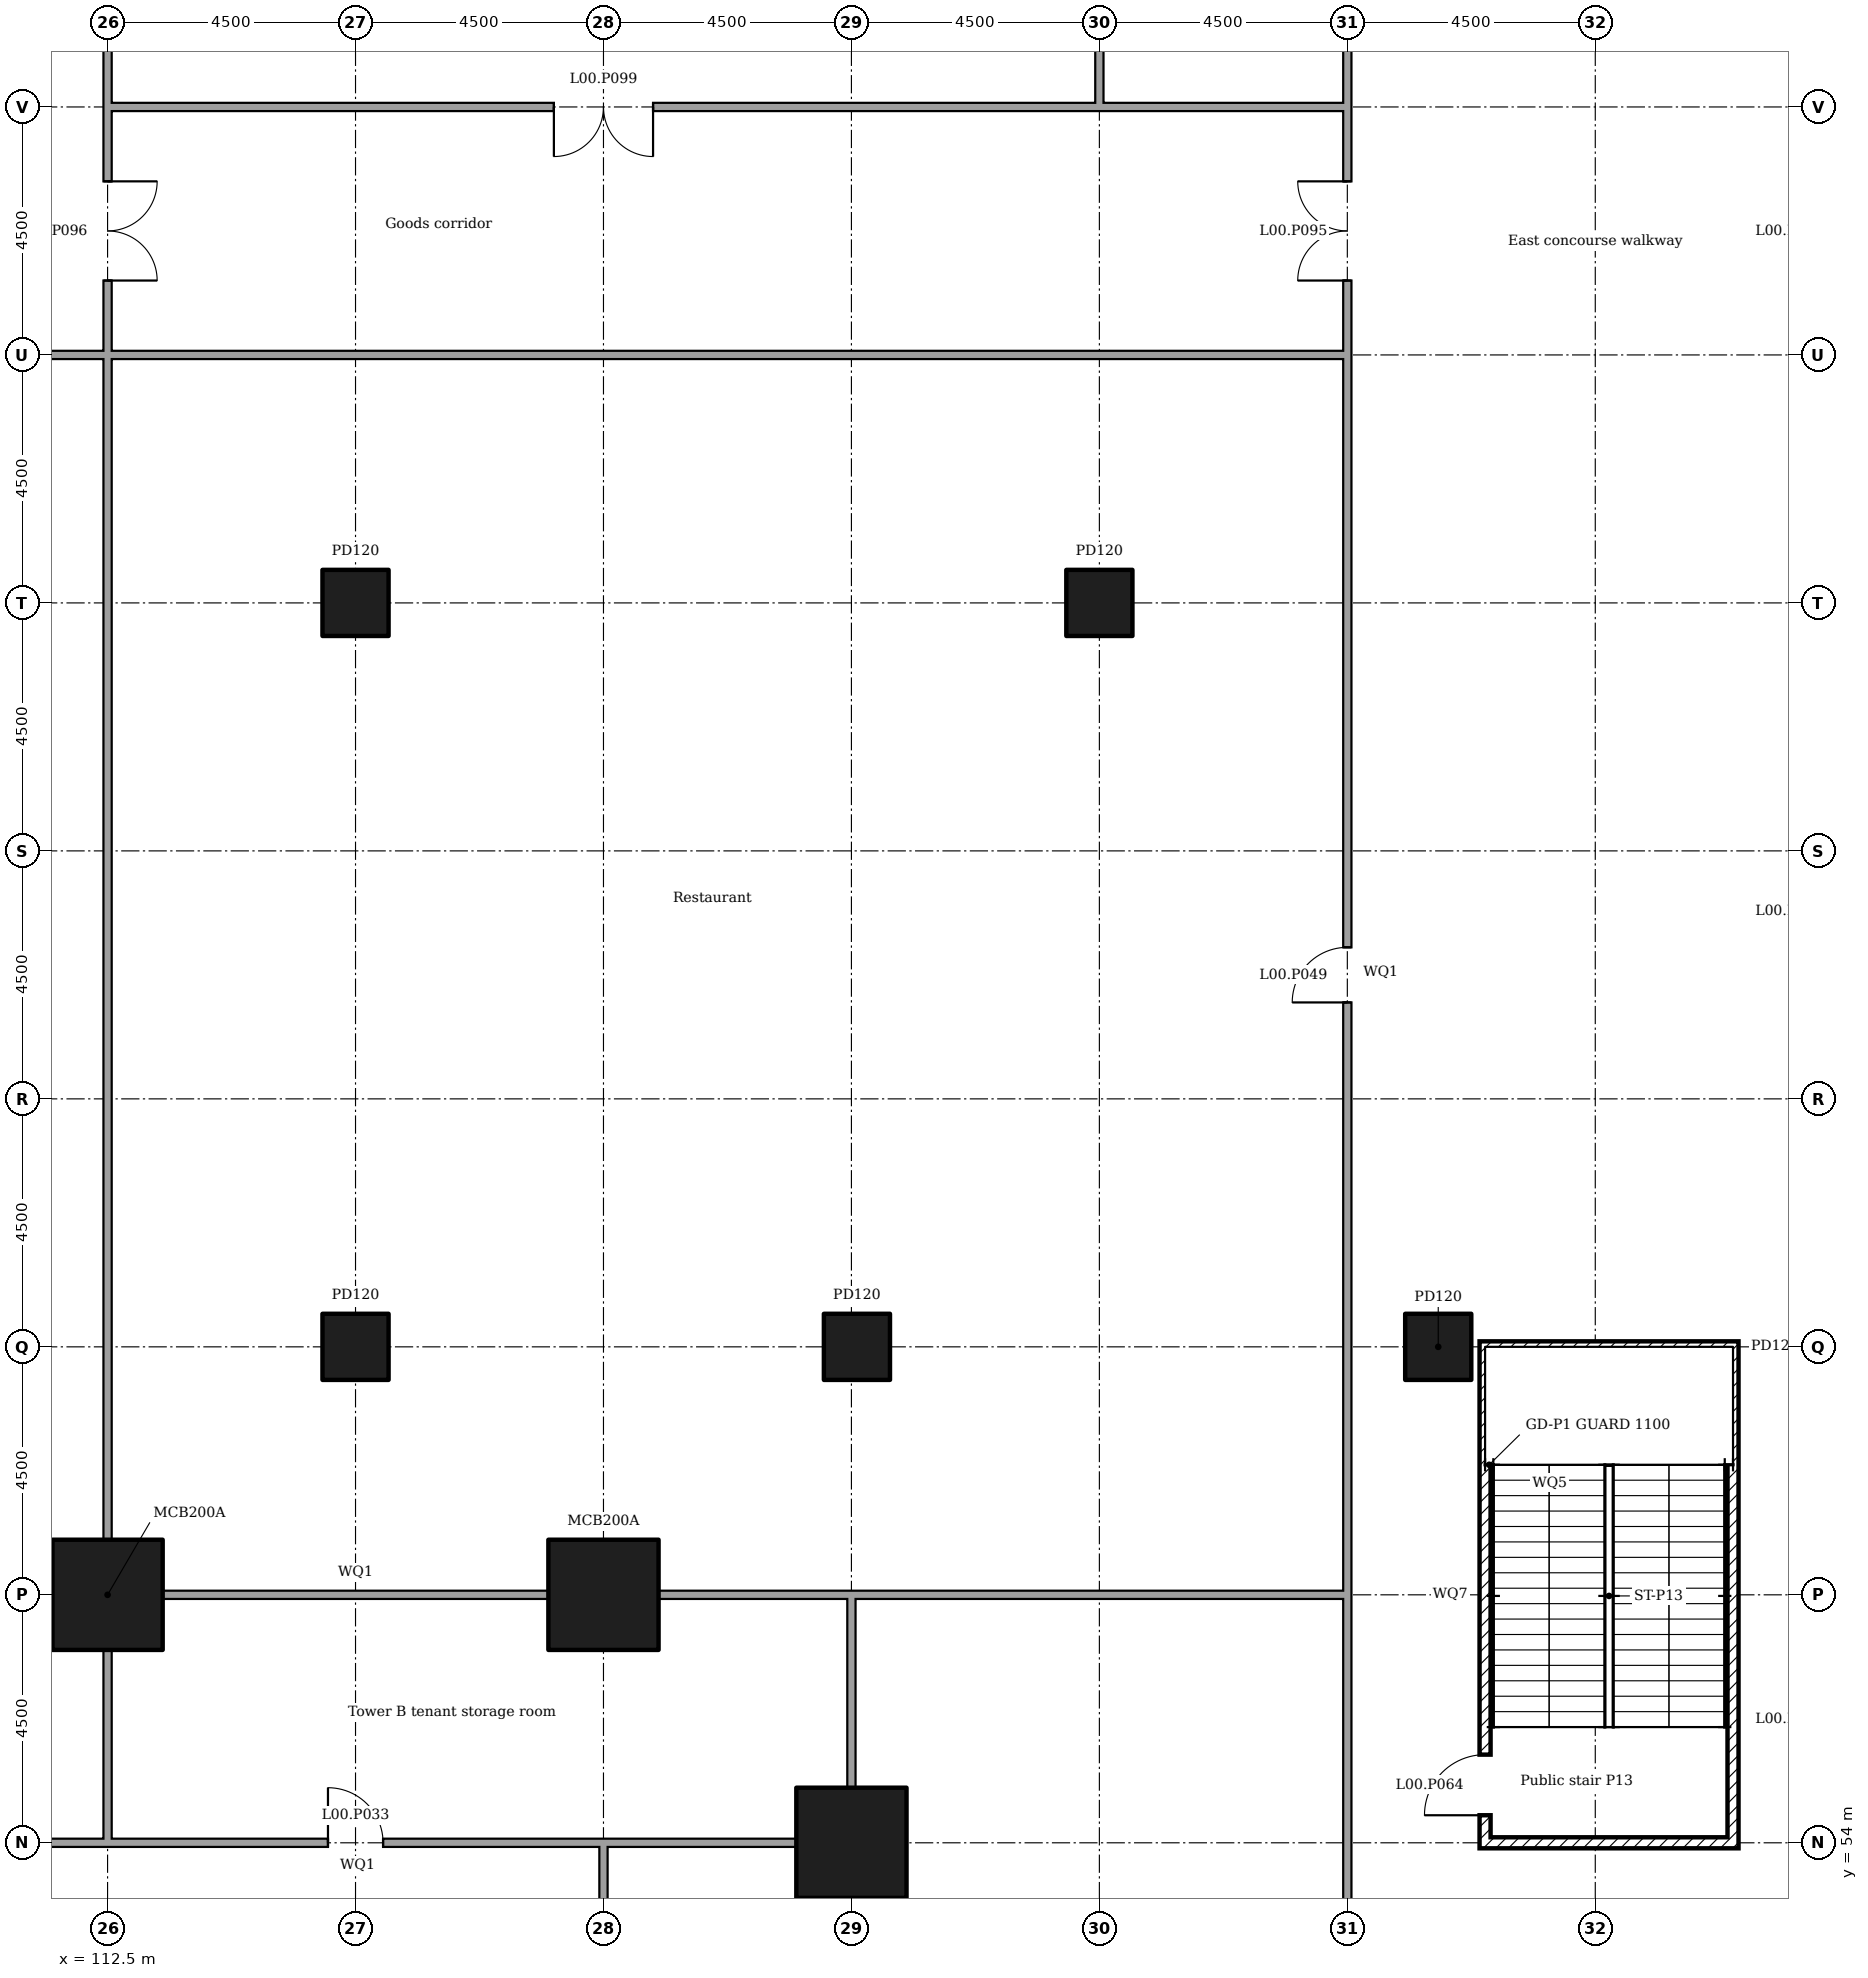
"""IFC4 building model, lengths in metres.
Left out: names, types, materials, properties, quantities, classifications, styles, units other than length and angle.
Written with IfcOpenShell. Run it as: python <this file> out.ifc"""

import sys

from ifc_helpers import new_model, si_unit, direction, frame, frame_2d, origin, origin_2d, place, context, subcontext, project, spatial, rectangle, extrude, element, fill, save


model = new_model("IFC4")
c1 = context("Model", 3, precision=1e-05, world=origin(), true_north=direction((0.0, 1.0)))
c2 = subcontext(c1, "Body", "Model", "MODEL_VIEW")
j1 = project(units=[si_unit("LENGTHUNIT", "METRE"), si_unit("PLANEANGLEUNIT", "RADIAN")], contexts=[c1])
p1 = place(None, origin())
s1 = spatial("IfcSite", under=j1, at=p1, CompositionType="ELEMENT")
p2 = place(p1, origin())
s2 = spatial("IfcBuilding", under=s1, at=p2, CompositionType="ELEMENT")
p3 = place(p2, origin())
s3 = spatial("IfcBuildingStorey", under=s2, at=p3, CompositionType="ELEMENT", Elevation=0.0)
for number, where in (
    (1, (112.5, 58.5, 0.0)),
    (2, (121.5, 58.5, 0.0)),
    (3, (126.0, 54.0, 0.0)),
):
    element("IfcColumn", number, at=place(p3, frame(where)), inside=s3, PredefinedType="COLUMN", context=c2, shape_type="SweptSolid", body=[
        extrude(rectangle(XDim=2.0, YDim=2.0, at=origin_2d()), origin(), (0.0, 0.0, 1.0), 6.0),
    ])
for number, where in (
    (4, (117.0, 63.0, 0.0)),
    (5, (117.0, 76.5, 0.0)),
    (6, (126.1, 63.0, 0.0)),
    (7, (130.5, 76.5, 0.0)),
    (8, (136.65, 63.0, 0.0)),
):
    element("IfcColumn", number, at=place(p3, frame(where)), inside=s3, PredefinedType="COLUMN", context=c2, shape_type="SweptSolid", body=[
        extrude(rectangle(XDim=1.2, YDim=1.2, at=origin_2d()), origin(), (0.0, 0.0, 1.0), 6.0),
    ])
p4 = place(p3, frame((104.02, 54.0, 0.0)))
e9 = element("IfcWall", 9, at=p4, inside=s3, PredefinedType="PARTITIONING", context=c2, shape_type="SweptSolid", body=[
    extrude(rectangle(XDim=8.555, YDim=0.15, at=frame_2d((4.277, 0.0))), origin(), (0.0, 0.0, 1.0), 5.55),
])
p5 = place(p4, frame((3.75, 0.0, 0.0)))
e10 = element("IfcOpeningElement", 10, at=p5, cuts=e9, PredefinedType="OPENING", context=c2, shape_type="SweptSolid", body=[
    extrude(rectangle(XDim=1.0, YDim=2.1, at=frame_2d((0.5, 1.05))), frame((0.0, 0.085, 0.0), z_axis=(0.0, -1.0, 0.0), x_axis=(1.0, 0.0, 0.0)), (0.0, 0.0, 1.0), 0.17),
])
p6 = place(p3, frame((112.5, 54.0, 0.0)))
e11 = element("IfcWall", 11, at=p6, inside=s3, PredefinedType="PARTITIONING", context=c2, shape_type="SweptSolid", body=[
    extrude(rectangle(XDim=9.075, YDim=0.15, at=frame_2d((4.538, 0.0))), origin(), (0.0, 0.0, 1.0), 5.55),
])
p7 = place(p6, frame((4.0, 0.0, 0.0)))
e12 = element("IfcOpeningElement", 12, at=p7, cuts=e11, PredefinedType="OPENING", context=c2, shape_type="SweptSolid", body=[
    extrude(rectangle(XDim=1.0, YDim=2.1, at=frame_2d((0.5, 1.05))), frame((0.0, 0.085, 0.0), z_axis=(0.0, -1.0, 0.0), x_axis=(1.0, 0.0, 0.0)), (0.0, 0.0, 1.0), 0.17),
])
p8 = place(p3, frame((121.5, 50.02, 0.0), z_axis=(0.0, 0.0, 1.0), x_axis=(0.0, 1.0, 0.0)))
e13 = element("IfcWall", 13, at=p8, inside=s3, PredefinedType="PARTITIONING", context=c2, shape_type="SweptSolid", body=[
    extrude(rectangle(XDim=3.905, YDim=0.15, at=frame_2d((1.953, 0.0))), origin(), (0.0, 0.0, 1.0), 5.55),
])
p9 = place(p3, frame((112.5, 54.075, 0.0), z_axis=(0.0, 0.0, 1.0), x_axis=(0.0, 1.0, 0.0)))
e14 = element("IfcWall", 14, at=p9, inside=s3, PredefinedType="PARTITIONING", context=c2, shape_type="SweptSolid", body=[
    extrude(rectangle(XDim=3.43, YDim=0.15, at=frame_2d((1.715, 0.0))), origin(), (0.0, 0.0, 1.0), 5.55),
])
p10 = place(p3, frame((99.995, 58.5, 0.0)))
e15 = element("IfcWall", 15, at=p10, inside=s3, PredefinedType="PARTITIONING", context=c2, shape_type="SweptSolid", body=[
    extrude(rectangle(XDim=11.51, YDim=0.15, at=frame_2d((5.755, 0.0))), origin(), (0.0, 0.0, 1.0), 5.55),
])
p11 = place(p3, frame((121.5, 54.0, 0.0)))
e16 = element("IfcWall", 16, at=p11, inside=s3, PredefinedType="PARTITIONING", context=c2, shape_type="SweptSolid", body=[
    extrude(rectangle(XDim=3.505, YDim=0.15, at=frame_2d((1.752, 0.0))), origin(), (0.0, 0.0, 1.0), 5.55),
])
p12 = place(p3, frame((126.0, 54.995, 0.0), z_axis=(0.0, 0.0, 1.0), x_axis=(0.0, 1.0, 0.0)))
e17 = element("IfcWall", 17, at=p12, inside=s3, PredefinedType="PARTITIONING", context=c2, shape_type="SweptSolid", body=[
    extrude(rectangle(XDim=3.58, YDim=0.15, at=frame_2d((1.79, 0.0))), origin(), (0.0, 0.0, 1.0), 5.55),
])
p13 = place(p3, frame((113.495, 58.5, 0.0)))
e18 = element("IfcWall", 18, at=p13, inside=s3, PredefinedType="PARTITIONING", context=c2, shape_type="SweptSolid", body=[
    extrude(rectangle(XDim=7.01, YDim=0.15, at=frame_2d((3.505, 0.0))), origin(), (0.0, 0.0, 1.0), 5.55),
])
p14 = place(p3, frame((122.495, 58.5, 0.0)))
e19 = element("IfcWall", 19, at=p14, inside=s3, PredefinedType="PARTITIONING", context=c2, shape_type="SweptSolid", body=[
    extrude(rectangle(XDim=3.43, YDim=0.15, at=frame_2d((1.715, 0.0))), origin(), (0.0, 0.0, 1.0), 5.55),
])
p15 = place(p3, frame((126.0, 45.995, 0.0), z_axis=(0.0, 0.0, 1.0), x_axis=(0.0, 1.0, 0.0)))
e20 = element("IfcWall", 20, at=p15, inside=s3, PredefinedType="PARTITIONING", context=c2, shape_type="SweptSolid", body=[
    extrude(rectangle(XDim=7.01, YDim=0.15, at=frame_2d((3.505, 0.0))), origin(), (0.0, 0.0, 1.0), 5.55),
])
p16 = place(p3, frame((135.0, 45.0, 0.0), z_axis=(0.0, 0.0, 1.0), x_axis=(0.0, 1.0, 0.0)))
e21 = element("IfcWall", 21, at=p16, inside=s3, PredefinedType="PARTITIONING", context=c2, shape_type="SweptSolid", body=[
    extrude(rectangle(XDim=13.575, YDim=0.15, at=frame_2d((6.788, 0.0))), origin(), (0.0, 0.0, 1.0), 5.55),
])
p17 = place(p16, frame((6.25, 0.0, 0.0)))
e22 = element("IfcOpeningElement", 22, at=p17, cuts=e21, PredefinedType="OPENING", context=c2, shape_type="SweptSolid", body=[
    extrude(rectangle(XDim=1.0, YDim=2.1, at=frame_2d((0.5, 1.05))), frame((0.0, 0.085, 0.0), z_axis=(0.0, -1.0, 0.0), x_axis=(1.0, 0.0, 0.0)), (0.0, 0.0, 1.0), 0.17),
])
p18 = place(p3, frame((126.0, 58.5, 0.0)))
e23 = element("IfcWall", 23, at=p18, inside=s3, PredefinedType="PARTITIONING", context=c2, shape_type="SweptSolid", body=[
    extrude(rectangle(XDim=8.925, YDim=0.15, at=frame_2d((4.462, 0.0))), origin(), (0.0, 0.0, 1.0), 5.55),
])
p19 = place(p3, frame((135.0, 58.5, 0.0), z_axis=(0.0, 0.0, 1.0), x_axis=(0.0, 1.0, 0.0)))
e24 = element("IfcWall", 24, at=p19, inside=s3, PredefinedType="PARTITIONING", context=c2, shape_type="SweptSolid", body=[
    extrude(rectangle(XDim=22.575, YDim=0.15, at=frame_2d((11.288, 0.0))), origin(), (0.0, 0.0, 1.0), 5.55),
])
p20 = place(p19, frame((10.75, 0.0, 0.0)))
e25 = element("IfcOpeningElement", 25, at=p20, cuts=e24, PredefinedType="OPENING", context=c2, shape_type="SweptSolid", body=[
    extrude(rectangle(XDim=1.0, YDim=2.1, at=frame_2d((0.5, 1.05))), frame((0.0, 0.085, 0.0), z_axis=(0.0, -1.0, 0.0), x_axis=(1.0, 0.0, 0.0)), (0.0, 0.0, 1.0), 0.17),
])
p21 = place(p3, frame((135.0, 81.0, 0.0), z_axis=(0.0, 0.0, 1.0), x_axis=(0.0, 1.0, 0.0)))
e26 = element("IfcWall", 26, at=p21, inside=s3, PredefinedType="PARTITIONING", context=c2, shape_type="SweptSolid", body=[
    extrude(rectangle(XDim=4.575, YDim=0.15, at=frame_2d((2.288, 0.0))), origin(), (0.0, 0.0, 1.0), 5.55),
])
p22 = place(p21, frame((1.35, 0.0, 0.0)))
e27 = element("IfcOpeningElement", 27, at=p22, cuts=e26, PredefinedType="OPENING", context=c2, shape_type="SweptSolid", body=[
    extrude(rectangle(XDim=1.8, YDim=2.1, at=frame_2d((0.9, 1.05))), frame((0.0, 0.085, 0.0), z_axis=(0.0, -1.0, 0.0), x_axis=(1.0, 0.0, 0.0)), (0.0, 0.0, 1.0), 0.17),
])
p23 = place(p3, frame((135.0, 85.5, 0.0), z_axis=(0.0, 0.0, 1.0), x_axis=(0.0, 1.0, 0.0)))
e28 = element("IfcWall", 28, at=p23, inside=s3, PredefinedType="PARTITIONING", context=c2, shape_type="SweptSolid", body=[
    extrude(rectangle(XDim=4.575, YDim=0.15, at=frame_2d((2.288, 0.0))), origin(), (0.0, 0.0, 1.0), 5.55),
])
p24 = place(p3, frame((137.5, 53.9, 0.0), z_axis=(0.0, 0.0, 1.0), x_axis=(0.0, 1.0, 0.0)))
e29 = element("IfcWall", 29, at=p24, inside=s3, PredefinedType="SOLIDWALL", context=c2, shape_type="SweptSolid", body=[
    extrude(rectangle(XDim=9.2, YDim=0.2, at=frame_2d((4.6, 0.0))), origin(), (0.0, 0.0, 1.0), 5.55),
])
p25 = place(p24, frame((0.6, 0.0, 0.0)))
e30 = element("IfcOpeningElement", 30, at=p25, cuts=e29, PredefinedType="OPENING", context=c2, shape_type="SweptSolid", body=[
    extrude(rectangle(XDim=1.1, YDim=2.1, at=frame_2d((0.55, 1.05))), frame((0.0, 0.11, 0.0), z_axis=(0.0, -1.0, 0.0), x_axis=(1.0, 0.0, 0.0)), (0.0, 0.0, 1.0), 0.22),
])
p26 = place(p3, frame((142.0, 53.9, 0.0), z_axis=(0.0, 0.0, 1.0), x_axis=(0.0, 1.0, 0.0)))
e31 = element("IfcWall", 31, at=p26, inside=s3, PredefinedType="SOLIDWALL", context=c2, shape_type="SweptSolid", body=[
    extrude(rectangle(XDim=9.2, YDim=0.2, at=frame_2d((4.6, 0.0))), origin(), (0.0, 0.0, 1.0), 5.55),
])
for number, where in (
    (32, (137.6, 54.0, 0.0)),
    (33, (137.6, 63.0, 0.0)),
):
    element("IfcWall", number, at=place(p3, frame(where)), inside=s3, PredefinedType="SOLIDWALL", context=c2, shape_type="SweptSolid", body=[
        extrude(rectangle(XDim=4.3, YDim=0.2, at=frame_2d((2.15, 0.0))), origin(), (0.0, 0.0, 1.0), 5.55),
    ])
p27 = place(p3, frame((112.5, 59.495, 0.0), z_axis=(0.0, 0.0, 1.0), x_axis=(0.0, 1.0, 0.0)))
e34 = element("IfcWall", 34, at=p27, inside=s3, PredefinedType="PARTITIONING", context=c2, shape_type="SweptSolid", body=[
    extrude(rectangle(XDim=21.58, YDim=0.15, at=frame_2d((10.79, 0.0))), origin(), (0.0, 0.0, 1.0), 5.55),
])
p28 = place(p3, frame((94.575, 81.0, 0.0)))
e35 = element("IfcWall", 35, at=p28, inside=s3, PredefinedType="PARTITIONING", context=c2, shape_type="SweptSolid", body=[
    extrude(rectangle(XDim=17.85, YDim=0.15, at=frame_2d((8.925, 0.0))), origin(), (0.0, 0.0, 1.0), 5.55),
])
p29 = place(p3, frame((112.425, 81.0, 0.0)))
e36 = element("IfcWall", 36, at=p29, inside=s3, PredefinedType="PARTITIONING", context=c2, shape_type="SweptSolid", body=[
    extrude(rectangle(XDim=22.5, YDim=0.15, at=frame_2d((11.25, 0.0))), origin(), (0.0, 0.0, 1.0), 5.55),
])
p30 = place(p3, frame((112.5, 81.075, 0.0), z_axis=(0.0, 0.0, 1.0), x_axis=(0.0, 1.0, 0.0)))
e37 = element("IfcWall", 37, at=p30, inside=s3, PredefinedType="PARTITIONING", context=c2, shape_type="SweptSolid", body=[
    extrude(rectangle(XDim=4.5, YDim=0.15, at=frame_2d((2.25, 0.0))), origin(), (0.0, 0.0, 1.0), 5.55),
])
p31 = place(p30, frame((1.275, 0.0, 0.0)))
e38 = element("IfcOpeningElement", 38, at=p31, cuts=e37, PredefinedType="OPENING", context=c2, shape_type="SweptSolid", body=[
    extrude(rectangle(XDim=1.8, YDim=2.1, at=frame_2d((0.9, 1.05))), frame((0.0, 0.085, 0.0), z_axis=(0.0, -1.0, 0.0), x_axis=(1.0, 0.0, 0.0)), (0.0, 0.0, 1.0), 0.17),
])
p32 = place(p3, frame((112.5, 85.5, 0.0), z_axis=(0.0, 0.0, 1.0), x_axis=(0.0, 1.0, 0.0)))
e39 = element("IfcWall", 39, at=p32, inside=s3, PredefinedType="PARTITIONING", context=c2, shape_type="SweptSolid", body=[
    extrude(rectangle(XDim=4.425, YDim=0.15, at=frame_2d((2.212, 0.0))), origin(), (0.0, 0.0, 1.0), 5.55),
])
p33 = place(p32, frame((1.35, 0.0, 0.0)))
e40 = element("IfcOpeningElement", 40, at=p33, cuts=e39, PredefinedType="OPENING", context=c2, shape_type="SweptSolid", body=[
    extrude(rectangle(XDim=1.8, YDim=2.1, at=frame_2d((0.9, 1.05))), frame((0.0, 0.085, 0.0), z_axis=(0.0, -1.0, 0.0), x_axis=(1.0, 0.0, 0.0)), (0.0, 0.0, 1.0), 0.17),
])
p34 = place(p3, frame((112.575, 85.5, 0.0)))
e41 = element("IfcWall", 41, at=p34, inside=s3, PredefinedType="PARTITIONING", context=c2, shape_type="SweptSolid", body=[
    extrude(rectangle(XDim=18.0, YDim=0.15, at=frame_2d((9.0, 0.0))), origin(), (0.0, 0.0, 1.0), 5.55),
])
p35 = place(p34, frame((8.025, 0.0, 0.0)))
e42 = element("IfcOpeningElement", 42, at=p35, cuts=e41, PredefinedType="OPENING", context=c2, shape_type="SweptSolid", body=[
    extrude(rectangle(XDim=1.8, YDim=2.1, at=frame_2d((0.9, 1.05))), frame((0.0, 0.085, 0.0), z_axis=(0.0, -1.0, 0.0), x_axis=(1.0, 0.0, 0.0)), (0.0, 0.0, 1.0), 0.17),
])
p36 = place(p3, frame((130.5, 85.5, 0.0)))
e43 = element("IfcWall", 43, at=p36, inside=s3, PredefinedType="PARTITIONING", context=c2, shape_type="SweptSolid", body=[
    extrude(rectangle(XDim=4.425, YDim=0.15, at=frame_2d((2.212, 0.0))), origin(), (0.0, 0.0, 1.0), 5.55),
])
p37 = place(p3, frame((130.5, 85.575, 0.0), z_axis=(0.0, 0.0, 1.0), x_axis=(0.0, 1.0, 0.0)))
e44 = element("IfcWall", 44, at=p37, inside=s3, PredefinedType="PARTITIONING", context=c2, shape_type="SweptSolid", body=[
    extrude(rectangle(XDim=3.83, YDim=0.15, at=frame_2d((1.915, 0.0))), origin(), (0.0, 0.0, 1.0), 5.55),
])
for number, where in (
    (45, (137.6, 60.96, 0.0)),
    (46, (137.6, 62.3, 0.0)),
):
    element("IfcWall", number, at=place(p3, frame(where)), inside=s3, PredefinedType="SOLIDWALL", context=c2, shape_type="SweptSolid", body=[
        extrude(rectangle(XDim=4.3, YDim=0.2, at=frame_2d((2.15, 0.0))), origin(), (0.0, 0.0, 1.0), 2.8),
    ])
p38 = place(p7, origin())
e47 = element("IfcDoor", 47, at=p38, inside=s3, OperationType="SINGLE_SWING_RIGHT", PredefinedType="DOOR", context=c2, shape_type="SweptSolid", body=[
    extrude(rectangle(XDim=1.0, YDim=2.1, at=frame_2d((0.5, 1.05))), frame((0.0, 0.025, 0.0), z_axis=(0.0, -1.0, 0.0), x_axis=(1.0, 0.0, 0.0)), (0.0, 0.0, 1.0), 0.05),
])
fill(e12, e47)
p39 = place(p20, origin())
e48 = element("IfcDoor", 48, at=p39, inside=s3, OperationType="SINGLE_SWING_RIGHT", PredefinedType="DOOR", context=c2, shape_type="SweptSolid", body=[
    extrude(rectangle(XDim=1.0, YDim=2.1, at=frame_2d((0.5, 1.05))), frame((0.0, 0.025, 0.0), z_axis=(0.0, -1.0, 0.0), x_axis=(1.0, 0.0, 0.0)), (0.0, 0.0, 1.0), 0.05),
])
fill(e25, e48)
p40 = place(p25, origin())
e49 = element("IfcDoor", 49, at=p40, inside=s3, OperationType="SINGLE_SWING_RIGHT", PredefinedType="DOOR", context=c2, shape_type="SweptSolid", body=[
    extrude(rectangle(XDim=1.1, YDim=2.1, at=frame_2d((0.55, 1.05))), frame((0.0, 0.025, 0.0), z_axis=(0.0, -1.0, 0.0), x_axis=(1.0, 0.0, 0.0)), (0.0, 0.0, 1.0), 0.05),
])
fill(e30, e49)
p41 = place(p22, origin())
e50 = element("IfcDoor", 50, at=p41, inside=s3, OperationType="DOUBLE_DOOR_SINGLE_SWING", PredefinedType="DOOR", context=c2, shape_type="SweptSolid", body=[
    extrude(rectangle(XDim=1.8, YDim=2.1, at=frame_2d((0.9, 1.05))), frame((0.0, 0.025, 0.0), z_axis=(0.0, -1.0, 0.0), x_axis=(1.0, 0.0, 0.0)), (0.0, 0.0, 1.0), 0.05),
])
fill(e27, e50)
p42 = place(p31, frame((1.8, 0.0, 0.0), x_axis=(-1.0, 0.0, 0.0)))
e51 = element("IfcDoor", 51, at=p42, inside=s3, OperationType="DOUBLE_DOOR_SINGLE_SWING", PredefinedType="DOOR", context=c2, shape_type="SweptSolid", body=[
    extrude(rectangle(XDim=1.8, YDim=2.1, at=frame_2d((0.9, 1.05))), frame((0.0, 0.025, 0.0), z_axis=(0.0, -1.0, 0.0), x_axis=(1.0, 0.0, 0.0)), (0.0, 0.0, 1.0), 0.05),
])
fill(e38, e51)
p43 = place(p35, frame((1.8, 0.0, 0.0), x_axis=(-1.0, 0.0, 0.0)))
e52 = element("IfcDoor", 52, at=p43, inside=s3, OperationType="DOUBLE_DOOR_SINGLE_SWING", PredefinedType="DOOR", context=c2, shape_type="SweptSolid", body=[
    extrude(rectangle(XDim=1.8, YDim=2.1, at=frame_2d((0.9, 1.05))), frame((0.0, 0.025, 0.0), z_axis=(0.0, -1.0, 0.0), x_axis=(1.0, 0.0, 0.0)), (0.0, 0.0, 1.0), 0.05),
])
fill(e42, e52)
save(model, sys.argv[1])
